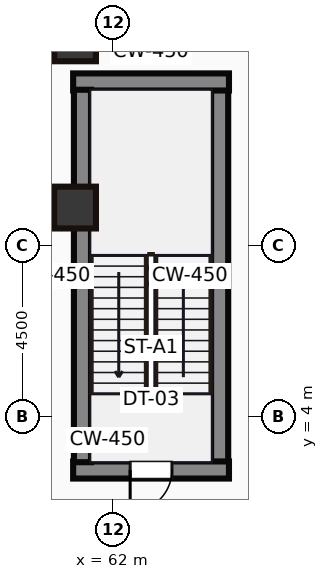
"""IFC4 building model, lengths in metres.
Left out: names, types, materials, properties, quantities, classifications, styles, units other than length and angle.
Written with IfcOpenShell. Run it as: python <this file> out.ifc"""

import sys

from ifc_helpers import new_model, si_unit, direction, frame, frame_2d, origin, origin_2d, place, context, subcontext, project, spatial, rectangle, hollow_rectangle, extrude, source, transform, mapped, element, fill, save


model = new_model("IFC4")
c1 = context("Model", 3, precision=1e-05, world=origin(), true_north=direction((0.0, 1.0)))
c2 = subcontext(c1, "Body", "Model", "MODEL_VIEW")
j1 = project(units=[si_unit("LENGTHUNIT", "METRE"), si_unit("PLANEANGLEUNIT", "RADIAN")], contexts=[c1])
p1 = place(None, origin())
s1 = spatial("IfcSite", under=j1, at=p1, CompositionType="ELEMENT")
p2 = place(p1, origin())
s2 = spatial("IfcBuilding", under=s1, at=p2, CompositionType="ELEMENT")
p3 = place(p2, frame((0.0, 0.0, 11.0)))
s3 = spatial("IfcBuildingStorey", under=s2, at=p3, CompositionType="ELEMENT", Elevation=11.0)
m1 = source(origin(), c2, "Body", "SweptSolid", [
    extrude(hollow_rectangle(XDim=1.1, YDim=1.3, WallThickness=0.055, at=origin_2d()), origin(), (0.0, 0.0, 1.0), 5.0),
])
p4 = place(p3, frame((61.0, 14.0, 0.0), z_axis=(0.0, 0.0, 1.0), x_axis=(1.0, 0.0, 0.0)))
e1 = element("IfcColumn", 1, at=p4, inside=s3, PredefinedType="PILASTER", context=c2, shape_type="MappedRepresentation", body=[
    mapped(m1, transform((0.0, 0.0, 0.0))),
])
m2 = source(origin(), c2, "Body", "SweptSolid", [
    extrude(hollow_rectangle(XDim=1.1, YDim=1.1, WallThickness=0.05, at=origin_2d()), origin(), (0.0, 0.0, 1.0), 5.0),
])
p5 = place(p3, frame((61.0, 9.5, 0.0), z_axis=(0.0, 0.0, 1.0), x_axis=(1.0, 0.0, 0.0)))
e2 = element("IfcColumn", 2, at=p5, inside=s3, PredefinedType="PILASTER", context=c2, shape_type="MappedRepresentation", body=[
    mapped(m2, transform((0.0, 0.0, 0.0))),
])
m3 = source(origin(), c2, "Body", "SweptSolid", [
    extrude(rectangle(XDim=4.1, YDim=0.45, at=frame_2d((2.05, 0.0))), origin(), (0.0, 0.0, 1.0), 5.0),
])
p6 = place(p3, frame((60.95, 2.595, 0.0), z_axis=(0.0, 0.0, 1.0), x_axis=(1.0, 0.0, 0.0)))
e3 = element("IfcWall", 3, at=p6, inside=s3, PredefinedType="SHEAR", context=c2, shape_type="MappedRepresentation", body=[
    mapped(m3, transform((0.0, 0.0, 0.0))),
])
p7 = place(p6, frame((1.5, 0.0, 0.0)))
e4 = element("IfcOpeningElement", 4, at=p7, cuts=e3, PredefinedType="OPENING", context=c2, shape_type="SweptSolid", body=[
    extrude(rectangle(XDim=1.1, YDim=2.15, at=frame_2d((0.55, 1.075))), frame((0.0, 0.235, 0.0), z_axis=(0.0, -1.0, 0.0), x_axis=(1.0, 0.0, 0.0)), (0.0, 0.0, 1.0), 0.47),
])
m4 = source(origin(), c2, "Body", "SweptSolid", [
    extrude(rectangle(XDim=9.8, YDim=0.45, at=frame_2d((4.9, 0.0))), origin(), (0.0, 0.0, 1.0), 5.0),
])
for number, where, z_axis, x_axis in (
    (5, (61.195, 2.8, 0.0), (0.0, 0.0, 1.0), (0.0, 1.0, 0.0)),
    (6, (64.805, 2.8, 0.0), (0.0, 0.0, 1.0), (0.0, 1.0, 0.0)),
):
    element("IfcWall", number, at=place(p3, frame(where, z_axis=z_axis, x_axis=x_axis)), inside=s3, PredefinedType="SHEAR", context=c2, shape_type="MappedRepresentation", body=[
        mapped(m4, transform((0.0, 0.0, 0.0))),
    ])
p8 = place(p3, frame((60.95, 12.805, 0.0), z_axis=(0.0, 0.0, 1.0), x_axis=(1.0, 0.0, 0.0)))
e7 = element("IfcWall", 7, at=p8, inside=s3, PredefinedType="SHEAR", context=c2, shape_type="MappedRepresentation", body=[
    mapped(m3, transform((0.0, 0.0, 0.0))),
])
m5 = source(origin(), c2, "Body", "SweptSolid", [
    extrude(rectangle(XDim=1.1, YDim=2.15, at=frame_2d((0.55, 1.075))), frame((0.0, 0.025, 0.0), z_axis=(0.0, -1.0, 0.0), x_axis=(1.0, 0.0, 0.0)), (0.0, 0.0, 1.0), 0.05),
])
p9 = place(p7, origin())
e8 = element("IfcDoor", 8, at=p9, inside=s3, OperationType="SINGLE_SWING_LEFT", PredefinedType="DOOR", context=c2, shape_type="MappedRepresentation", body=[
    mapped(m5, transform((0.0, 0.0, 0.0))),
])
fill(e4, e8)
save(model, sys.argv[1])
